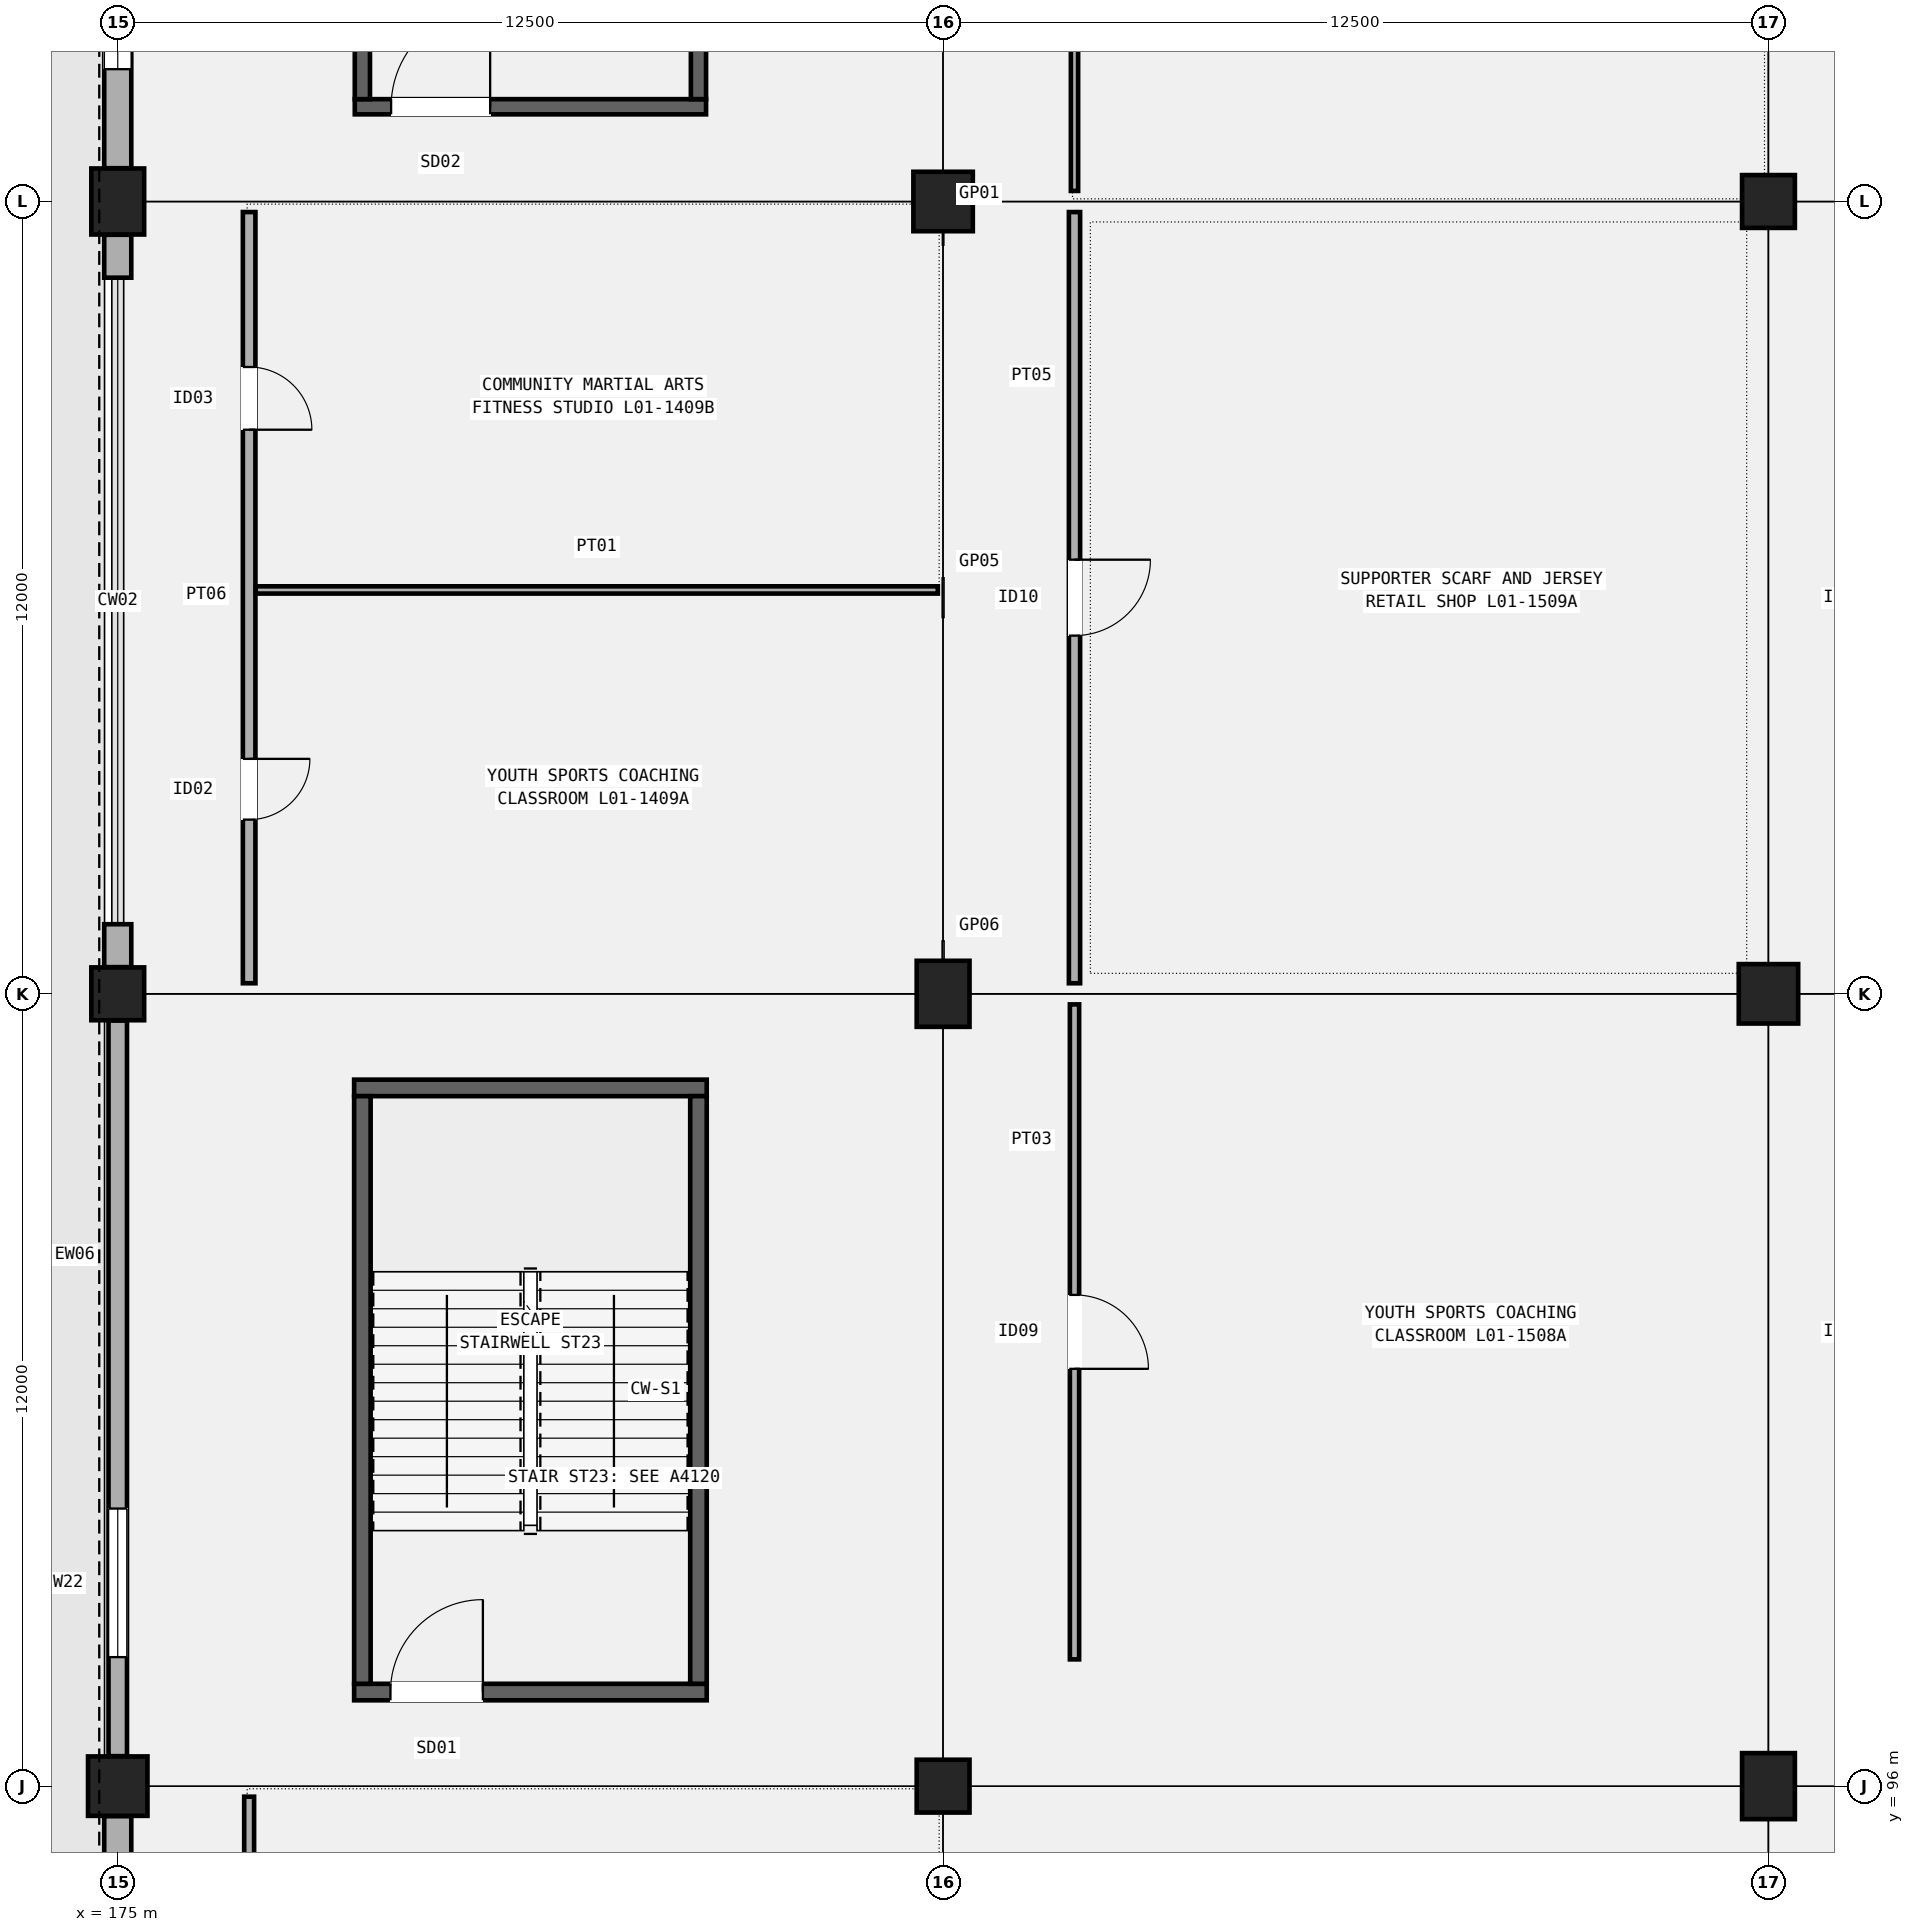
"""IFC4 building model, lengths in metres.
Left out: names, types, materials, properties, quantities, classifications, styles, units other than length and angle.
Written with IfcOpenShell. Run it as: python <this file> out.ifc"""

import sys

from ifc_helpers import new_model, si_unit, direction, frame, frame_2d, origin, origin_2d, place, context, subcontext, project, spatial, rectangle, extrude, element, fill, save


model = new_model("IFC4")
c1 = context("Model", 3, precision=1e-05, world=origin(), true_north=direction((0.0, 1.0)))
c2 = subcontext(c1, "Body", "Model", "MODEL_VIEW")
j1 = project(units=[si_unit("LENGTHUNIT", "METRE"), si_unit("PLANEANGLEUNIT", "RADIAN")], contexts=[c1])
p1 = place(None, origin())
s1 = spatial("IfcSite", under=j1, at=p1, CompositionType="ELEMENT")
p2 = place(p1, origin())
s2 = spatial("IfcBuilding", under=s1, at=p2, CompositionType="ELEMENT")
p3 = place(p2, frame((0.0, 0.0, 5.4)))
s3 = spatial("IfcBuildingStorey", under=s2, at=p3, CompositionType="ELEMENT", Elevation=5.4)
p4 = place(p3, frame((175.0, 96.0, 0.0), z_axis=(0.0, 0.0, 1.0), x_axis=(1.0, 0.0, 0.0)))
e1 = element("IfcColumn", 1, at=p4, inside=s3, PredefinedType="COLUMN", context=c2, shape_type="SweptSolid", body=[
    extrude(rectangle(XDim=0.9, YDim=0.9, at=origin_2d()), origin(), (0.0, 0.0, 1.0), 4.8),
])
p5 = place(p3, frame((175.0, 108.0, 0.0), z_axis=(0.0, 0.0, 1.0), x_axis=(1.0, 0.0, 0.0)))
e2 = element("IfcColumn", 2, at=p5, inside=s3, PredefinedType="COLUMN", context=c2, shape_type="SweptSolid", body=[
    extrude(rectangle(XDim=0.8, YDim=0.8, at=origin_2d()), origin(), (0.0, 0.0, 1.0), 4.8),
])
p6 = place(p3, frame((175.0, 120.0, 0.0), z_axis=(0.0, 0.0, 1.0), x_axis=(1.0, 0.0, 0.0)))
e3 = element("IfcColumn", 3, at=p6, inside=s3, PredefinedType="COLUMN", context=c2, shape_type="SweptSolid", body=[
    extrude(rectangle(XDim=0.8, YDim=1.0, at=origin_2d()), origin(), (0.0, 0.0, 1.0), 4.8),
])
p7 = place(p3, frame((187.5, 96.0, 0.0), z_axis=(0.0, 0.0, 1.0), x_axis=(1.0, 0.0, 0.0)))
e4 = element("IfcColumn", 4, at=p7, inside=s3, PredefinedType="COLUMN", context=c2, shape_type="SweptSolid", body=[
    extrude(rectangle(XDim=0.8, YDim=0.8, at=origin_2d()), origin(), (0.0, 0.0, 1.0), 4.8),
])
p8 = place(p3, frame((187.5, 108.0, 0.0), z_axis=(0.0, 0.0, 1.0), x_axis=(1.0, 0.0, 0.0)))
e5 = element("IfcColumn", 5, at=p8, inside=s3, PredefinedType="COLUMN", context=c2, shape_type="SweptSolid", body=[
    extrude(rectangle(XDim=0.8, YDim=1.0, at=origin_2d()), origin(), (0.0, 0.0, 1.0), 4.8),
])
p9 = place(p3, frame((187.5, 120.0, 0.0), z_axis=(0.0, 0.0, 1.0), x_axis=(1.0, 0.0, 0.0)))
e6 = element("IfcColumn", 6, at=p9, inside=s3, PredefinedType="COLUMN", context=c2, shape_type="SweptSolid", body=[
    extrude(rectangle(XDim=0.9, YDim=0.9, at=origin_2d()), origin(), (0.0, 0.0, 1.0), 4.8),
])
p10 = place(p3, frame((200.0, 96.0, 0.0), z_axis=(0.0, 0.0, 1.0), x_axis=(1.0, 0.0, 0.0)))
e7 = element("IfcColumn", 7, at=p10, inside=s3, PredefinedType="COLUMN", context=c2, shape_type="SweptSolid", body=[
    extrude(rectangle(XDim=0.8, YDim=1.0, at=origin_2d()), origin(), (0.0, 0.0, 1.0), 4.8),
])
p11 = place(p3, frame((200.0, 108.0, 0.0), z_axis=(0.0, 0.0, 1.0), x_axis=(1.0, 0.0, 0.0)))
e8 = element("IfcColumn", 8, at=p11, inside=s3, PredefinedType="COLUMN", context=c2, shape_type="SweptSolid", body=[
    extrude(rectangle(XDim=0.9, YDim=0.9, at=origin_2d()), origin(), (0.0, 0.0, 1.0), 4.8),
])
p12 = place(p3, frame((200.0, 120.0, 0.0), z_axis=(0.0, 0.0, 1.0), x_axis=(1.0, 0.0, 0.0)))
e9 = element("IfcColumn", 9, at=p12, inside=s3, PredefinedType="COLUMN", context=c2, shape_type="SweptSolid", body=[
    extrude(rectangle(XDim=0.8, YDim=0.8, at=origin_2d()), origin(), (0.0, 0.0, 1.0), 4.8),
])
p13 = place(p3, frame((175.0, 94.896, 0.0), z_axis=(0.0, 0.0, 1.0), x_axis=(0.0, 1.0, 0.0)))
e10 = element("IfcWall", 10, at=p13, inside=s3, PredefinedType="SOLIDWALL", context=c2, shape_type="SweptSolid", body=[
    extrude(rectangle(XDim=0.65, YDim=0.41, at=frame_2d((0.325, 0.0))), origin(), (0.0, 0.0, 1.0), 4.2),
])
p14 = place(p3, frame((175.0, 96.454, 0.0), z_axis=(0.0, 0.0, 1.0), x_axis=(0.0, 1.0, 0.0)))
e11 = element("IfcWall", 11, at=p14, inside=s3, PredefinedType="SOLIDWALL", context=c2, shape_type="SweptSolid", body=[
    extrude(rectangle(XDim=11.142, YDim=0.28, at=frame_2d((5.571, 0.0))), origin(), (0.0, 0.0, 1.0), 4.15),
])
p15 = place(p14, frame((1.5, 0.0, 0.95)))
e12 = element("IfcOpeningElement", 12, at=p15, cuts=e11, PredefinedType="OPENING", context=c2, shape_type="SweptSolid", body=[
    extrude(rectangle(XDim=2.25, YDim=2.2, at=frame_2d((1.125, 1.1))), frame((0.0, 0.15, 0.0), z_axis=(0.0, -1.0, 0.0), x_axis=(1.0, 0.0, 0.0)), (0.0, 0.0, 1.0), 0.3),
])
p16 = place(p3, frame((175.0, 108.404, 0.0), z_axis=(0.0, 0.0, 1.0), x_axis=(0.0, 1.0, 0.0)))
e13 = element("IfcWall", 13, at=p16, inside=s3, PredefinedType="SOLIDWALL", context=c2, shape_type="SweptSolid", body=[
    extrude(rectangle(XDim=0.65, YDim=0.41, at=frame_2d((0.325, 0.0))), origin(), (0.0, 0.0, 1.0), 4.2),
])
p17 = place(p3, frame((175.0, 118.846, 0.0), z_axis=(0.0, 0.0, 1.0), x_axis=(0.0, 1.0, 0.0)))
e14 = element("IfcWall", 14, at=p17, inside=s3, PredefinedType="SOLIDWALL", context=c2, shape_type="SweptSolid", body=[
    extrude(rectangle(XDim=0.65, YDim=0.41, at=frame_2d((0.325, 0.0))), origin(), (0.0, 0.0, 1.0), 4.2),
])
p18 = place(p3, frame((175.0, 120.504, 0.0), z_axis=(0.0, 0.0, 1.0), x_axis=(0.0, 1.0, 0.0)))
e15 = element("IfcWall", 15, at=p18, inside=s3, PredefinedType="SOLIDWALL", context=c2, shape_type="SweptSolid", body=[
    extrude(rectangle(XDim=11.042, YDim=0.41, at=frame_2d((5.521, 0.0))), origin(), (0.0, 0.0, 1.0), 4.15),
])
p19 = place(p18, frame((1.5, 0.0, 0.95)))
e16 = element("IfcOpeningElement", 16, at=p19, cuts=e15, PredefinedType="OPENING", context=c2, shape_type="SweptSolid", body=[
    extrude(rectangle(XDim=2.4, YDim=1.65, at=frame_2d((1.2, 0.825))), frame((0.0, 0.215, 0.0), z_axis=(0.0, -1.0, 0.0), x_axis=(1.0, 0.0, 0.0)), (0.0, 0.0, 1.0), 0.43),
])
p20 = place(p3, frame((178.58, 97.425, 0.0), z_axis=(0.0, 0.0, 1.0), x_axis=(1.0, 0.0, 0.0)))
e17 = element("IfcWall", 17, at=p20, inside=s3, PredefinedType="SHEAR", context=c2, shape_type="SweptSolid", body=[
    extrude(rectangle(XDim=5.34, YDim=0.25, at=frame_2d((2.67, 0.0))), origin(), (0.0, 0.0, 1.0), 4.55),
])
p21 = place(p20, frame((0.55, 0.0, 0.0)))
e18 = element("IfcOpeningElement", 18, at=p21, cuts=e17, PredefinedType="OPENING", context=c2, shape_type="SweptSolid", body=[
    extrude(rectangle(XDim=1.4, YDim=2.15, at=frame_2d((0.7, 1.075))), frame((0.0, 0.135, 0.0), z_axis=(0.0, -1.0, 0.0), x_axis=(1.0, 0.0, 0.0)), (0.0, 0.0, 1.0), 0.27),
])
p22 = place(p3, frame((178.58, 106.575, 0.0), z_axis=(0.0, 0.0, 1.0), x_axis=(1.0, 0.0, 0.0)))
e19 = element("IfcWall", 19, at=p22, inside=s3, PredefinedType="SHEAR", context=c2, shape_type="SweptSolid", body=[
    extrude(rectangle(XDim=5.34, YDim=0.25, at=frame_2d((2.67, 0.0))), origin(), (0.0, 0.0, 1.0), 4.55),
])
for number, where, z_axis, x_axis in (
    (20, (178.705, 97.55, 0.0), (0.0, 0.0, 1.0), (0.0, 1.0, 0.0)),
    (21, (183.795, 97.55, 0.0), (0.0, 0.0, 1.0), (0.0, 1.0, 0.0)),
):
    element("IfcWall", number, at=place(p3, frame(where, z_axis=z_axis, x_axis=x_axis)), inside=s3, PredefinedType="SHEAR", context=c2, shape_type="SweptSolid", body=[
        extrude(rectangle(XDim=8.9, YDim=0.25, at=frame_2d((4.45, 0.0))), origin(), (0.0, 0.0, 1.0), 4.55),
    ])
p23 = place(p3, frame((178.59, 121.435, 0.0), z_axis=(0.0, 0.0, 1.0), x_axis=(1.0, 0.0, 0.0)))
e22 = element("IfcWall", 22, at=p23, inside=s3, PredefinedType="SHEAR", context=c2, shape_type="SweptSolid", body=[
    extrude(rectangle(XDim=5.32, YDim=0.23, at=frame_2d((2.66, 0.0))), origin(), (0.0, 0.0, 1.0), 4.55),
])
p24 = place(p23, frame((0.55, 0.0, 0.0)))
e23 = element("IfcOpeningElement", 23, at=p24, cuts=e22, PredefinedType="OPENING", context=c2, shape_type="SweptSolid", body=[
    extrude(rectangle(XDim=1.5, YDim=2.2, at=frame_2d((0.75, 1.1))), frame((0.0, 0.125, 0.0), z_axis=(0.0, -1.0, 0.0), x_axis=(1.0, 0.0, 0.0)), (0.0, 0.0, 1.0), 0.25),
])
for number, where, z_axis, x_axis in (
    (24, (178.705, 121.55, 0.0), (0.0, 0.0, 1.0), (0.0, 1.0, 0.0)),
    (25, (183.795, 121.55, 0.0), (0.0, 0.0, 1.0), (0.0, 1.0, 0.0)),
):
    element("IfcWall", number, at=place(p3, frame(where, z_axis=z_axis, x_axis=x_axis)), inside=s3, PredefinedType="SHEAR", context=c2, shape_type="SweptSolid", body=[
        extrude(rectangle(XDim=8.9, YDim=0.23, at=frame_2d((4.45, 0.0))), origin(), (0.0, 0.0, 1.0), 4.55),
    ])
p25 = place(p3, frame((176.99, 84.16, 0.0), z_axis=(0.0, 0.0, 1.0), x_axis=(0.0, 1.0, 0.0)))
e26 = element("IfcWall", 26, at=p25, inside=s3, PredefinedType="PARTITIONING", context=c2, shape_type="SweptSolid", body=[
    extrude(rectangle(XDim=11.68, YDim=0.15, at=frame_2d((5.84, 0.0))), origin(), (0.0, 0.0, 1.0), 3.92),
])
p26 = place(p25, frame((6.29, 0.0, 0.0), z_axis=(0.0, 0.0, 1.0), x_axis=(-1.0, 0.0, 0.0)))
e27 = element("IfcOpeningElement", 27, at=p26, cuts=e26, PredefinedType="OPENING", context=c2, shape_type="SweptSolid", body=[
    extrude(rectangle(XDim=0.9, YDim=2.06, at=frame_2d((0.45, 1.03))), frame((0.0, 0.085, 0.0), z_axis=(0.0, -1.0, 0.0), x_axis=(1.0, 0.0, 0.0)), (0.0, 0.0, 1.0), 0.17),
])
p27 = place(p3, frame((176.99, 108.16, 0.0), z_axis=(0.0, 0.0, 1.0), x_axis=(0.0, 1.0, 0.0)))
e28 = element("IfcWall", 28, at=p27, inside=s3, PredefinedType="PARTITIONING", context=c2, shape_type="SweptSolid", body=[
    extrude(rectangle(XDim=11.68, YDim=0.19, at=frame_2d((5.84, 0.0))), origin(), (0.0, 0.0, 1.0), 3.92),
])
p28 = place(p27, frame((3.398, 0.0, 0.0), z_axis=(0.0, 0.0, 1.0), x_axis=(-1.0, 0.0, 0.0)))
e29 = element("IfcOpeningElement", 29, at=p28, cuts=e28, PredefinedType="OPENING", context=c2, shape_type="SweptSolid", body=[
    extrude(rectangle(XDim=0.92, YDim=2.1, at=frame_2d((0.46, 1.05))), frame((0.0, 0.105, 0.0), z_axis=(0.0, -1.0, 0.0), x_axis=(1.0, 0.0, 0.0)), (0.0, 0.0, 1.0), 0.21),
])
p29 = place(p27, frame((9.333, 0.0, 0.0), z_axis=(0.0, 0.0, 1.0), x_axis=(-1.0, 0.0, 0.0)))
e30 = element("IfcOpeningElement", 30, at=p29, cuts=e28, PredefinedType="OPENING", context=c2, shape_type="SweptSolid", body=[
    extrude(rectangle(XDim=0.95, YDim=2.12, at=frame_2d((0.475, 1.06))), frame((0.0, 0.105, 0.0), z_axis=(0.0, -1.0, 0.0), x_axis=(1.0, 0.0, 0.0)), (0.0, 0.0, 1.0), 0.21),
])
p30 = place(p3, frame((177.09, 114.117, 0.0), z_axis=(0.0, 0.0, 1.0), x_axis=(1.0, 0.0, 0.0)))
e31 = element("IfcWall", 31, at=p30, inside=s3, PredefinedType="PARTITIONING", context=c2, shape_type="SweptSolid", body=[
    extrude(rectangle(XDim=10.33, YDim=0.11, at=frame_2d((5.165, 0.0))), origin(), (0.0, 0.0, 1.0), 3.92),
])
p31 = place(p3, frame((189.49, 97.92, 0.0), z_axis=(0.0, 0.0, 1.0), x_axis=(0.0, 1.0, 0.0)))
e32 = element("IfcWall", 32, at=p31, inside=s3, PredefinedType="PARTITIONING", context=c2, shape_type="SweptSolid", body=[
    extrude(rectangle(XDim=9.92, YDim=0.14, at=frame_2d((4.96, 0.0))), origin(), (0.0, 0.0, 1.0), 3.92),
])
p32 = place(p31, frame((5.52, 0.0, 0.0), z_axis=(0.0, 0.0, 1.0), x_axis=(-1.0, 0.0, 0.0)))
e33 = element("IfcOpeningElement", 33, at=p32, cuts=e32, PredefinedType="OPENING", context=c2, shape_type="SweptSolid", body=[
    extrude(rectangle(XDim=1.12, YDim=2.18, at=frame_2d((0.56, 1.09))), frame((0.0, 0.08, 0.0), z_axis=(0.0, -1.0, 0.0), x_axis=(1.0, 0.0, 0.0)), (0.0, 0.0, 1.0), 0.16),
])
p33 = place(p3, frame((189.49, 108.16, 0.0), z_axis=(0.0, 0.0, 1.0), x_axis=(0.0, 1.0, 0.0)))
e34 = element("IfcWall", 34, at=p33, inside=s3, PredefinedType="PARTITIONING", context=c2, shape_type="SweptSolid", body=[
    extrude(rectangle(XDim=11.68, YDim=0.17, at=frame_2d((5.84, 0.0))), origin(), (0.0, 0.0, 1.0), 3.92),
])
p34 = place(p33, frame((6.415, 0.0, 0.0), z_axis=(0.0, 0.0, 1.0), x_axis=(-1.0, 0.0, 0.0)))
e35 = element("IfcOpeningElement", 35, at=p34, cuts=e34, PredefinedType="OPENING", context=c2, shape_type="SweptSolid", body=[
    extrude(rectangle(XDim=1.15, YDim=2.15, at=frame_2d((0.575, 1.075))), frame((0.0, 0.095, 0.0), z_axis=(0.0, -1.0, 0.0), x_axis=(1.0, 0.0, 0.0)), (0.0, 0.0, 1.0), 0.19),
])
p35 = place(p3, frame((189.49, 120.16, 0.0), z_axis=(0.0, 0.0, 1.0), x_axis=(0.0, 1.0, 0.0)))
e36 = element("IfcWall", 36, at=p35, inside=s3, PredefinedType="PARTITIONING", context=c2, shape_type="SweptSolid", body=[
    extrude(rectangle(XDim=11.68, YDim=0.11, at=frame_2d((5.84, 0.0))), origin(), (0.0, 0.0, 1.0), 3.92),
])
p36 = place(p35, frame((6.43, 0.0, 0.0), z_axis=(0.0, 0.0, 1.0), x_axis=(-1.0, 0.0, 0.0)))
e37 = element("IfcOpeningElement", 37, at=p36, cuts=e36, PredefinedType="OPENING", context=c2, shape_type="SweptSolid", body=[
    extrude(rectangle(XDim=1.18, YDim=2.2, at=frame_2d((0.59, 1.1))), frame((0.0, 0.065, 0.0), z_axis=(0.0, -1.0, 0.0), x_axis=(1.0, 0.0, 0.0)), (0.0, 0.0, 1.0), 0.13),
])
p37 = place(p15, origin())
e38 = element("IfcWindow", 38, at=p37, inside=s3, PartitioningType="SINGLE_PANEL", PredefinedType="WINDOW", context=c2, shape_type="SweptSolid", body=[
    extrude(rectangle(XDim=2.25, YDim=2.2, at=frame_2d((1.125, 1.1))), frame((0.0, 0.03, 0.0), z_axis=(0.0, -1.0, 0.0), x_axis=(1.0, 0.0, 0.0)), (0.0, 0.0, 1.0), 0.06),
])
fill(e12, e38)
p38 = place(p19, origin())
e39 = element("IfcWindow", 39, at=p38, inside=s3, PartitioningType="SINGLE_PANEL", PredefinedType="WINDOW", context=c2, shape_type="SweptSolid", body=[
    extrude(rectangle(XDim=2.4, YDim=1.65, at=frame_2d((1.2, 0.825))), frame((0.0, 0.03, 0.0), z_axis=(0.0, -1.0, 0.0), x_axis=(1.0, 0.0, 0.0)), (0.0, 0.0, 1.0), 0.06),
])
fill(e16, e39)
p39 = place(p21, origin())
e40 = element("IfcDoor", 40, at=p39, inside=s3, OperationType="SINGLE_SWING_RIGHT", PredefinedType="DOOR", context=c2, shape_type="SweptSolid", body=[
    extrude(rectangle(XDim=1.4, YDim=2.15, at=frame_2d((0.7, 1.075))), frame((0.0, 0.025, 0.0), z_axis=(0.0, -1.0, 0.0), x_axis=(1.0, 0.0, 0.0)), (0.0, 0.0, 1.0), 0.05),
])
fill(e18, e40)
p40 = place(p24, origin())
e41 = element("IfcDoor", 41, at=p40, inside=s3, OperationType="SINGLE_SWING_RIGHT", PredefinedType="DOOR", context=c2, shape_type="SweptSolid", body=[
    extrude(rectangle(XDim=1.5, YDim=2.2, at=frame_2d((0.75, 1.1))), frame((0.0, 0.025, 0.0), z_axis=(0.0, -1.0, 0.0), x_axis=(1.0, 0.0, 0.0)), (0.0, 0.0, 1.0), 0.05),
])
fill(e23, e41)
p41 = place(p28, origin())
e42 = element("IfcDoor", 42, at=p41, inside=s3, OperationType="SINGLE_SWING_LEFT", PredefinedType="DOOR", context=c2, shape_type="SweptSolid", body=[
    extrude(rectangle(XDim=0.92, YDim=2.1, at=frame_2d((0.46, 1.05))), frame((0.0, 0.025, 0.0), z_axis=(0.0, -1.0, 0.0), x_axis=(1.0, 0.0, 0.0)), (0.0, 0.0, 1.0), 0.05),
])
fill(e29, e42)
p42 = place(p29, origin())
e43 = element("IfcDoor", 43, at=p42, inside=s3, OperationType="SINGLE_SWING_RIGHT", PredefinedType="DOOR", context=c2, shape_type="SweptSolid", body=[
    extrude(rectangle(XDim=0.95, YDim=2.12, at=frame_2d((0.475, 1.06))), frame((0.0, 0.025, 0.0), z_axis=(0.0, -1.0, 0.0), x_axis=(1.0, 0.0, 0.0)), (0.0, 0.0, 1.0), 0.05),
])
fill(e30, e43)
p43 = place(p32, origin())
e44 = element("IfcDoor", 44, at=p43, inside=s3, OperationType="SINGLE_SWING_RIGHT", PredefinedType="DOOR", context=c2, shape_type="SweptSolid", body=[
    extrude(rectangle(XDim=1.12, YDim=2.18, at=frame_2d((0.56, 1.09))), frame((0.0, 0.025, 0.0), z_axis=(0.0, -1.0, 0.0), x_axis=(1.0, 0.0, 0.0)), (0.0, 0.0, 1.0), 0.05),
])
fill(e33, e44)
p44 = place(p34, origin())
e45 = element("IfcDoor", 45, at=p44, inside=s3, OperationType="SINGLE_SWING_LEFT", PredefinedType="DOOR", context=c2, shape_type="SweptSolid", body=[
    extrude(rectangle(XDim=1.15, YDim=2.15, at=frame_2d((0.575, 1.075))), frame((0.0, 0.025, 0.0), z_axis=(0.0, -1.0, 0.0), x_axis=(1.0, 0.0, 0.0)), (0.0, 0.0, 1.0), 0.05),
])
fill(e35, e45)
save(model, sys.argv[1])
